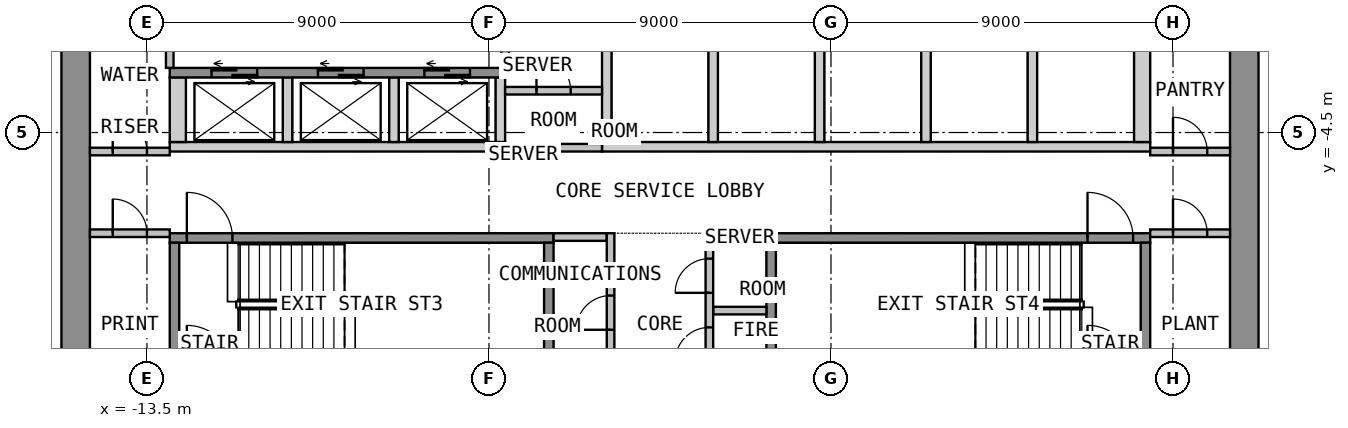
"""IFC4 building model, lengths in metres.
Left out: names, types, materials, properties, quantities, classifications, styles, units other than length and angle.
Written with IfcOpenShell. Run it as: python <this file> out.ifc"""

import sys

from ifc_helpers import new_model, si_unit, direction, frame, frame_2d, origin, place, context, subcontext, project, spatial, polyline, rectangle, outline, extrude, element, fill, save


model = new_model("IFC4")
c1 = context("Model", 3, precision=1e-05, world=origin(), true_north=direction((0.0, 1.0)))
c2 = subcontext(c1, "Body", "Model", "MODEL_VIEW")
j1 = project(units=[si_unit("LENGTHUNIT", "METRE"), si_unit("PLANEANGLEUNIT", "RADIAN")], contexts=[c1])
p1 = place(None, origin())
s1 = spatial("IfcSite", under=j1, at=p1, CompositionType="ELEMENT")
p2 = place(p1, origin())
s2 = spatial("IfcBuilding", under=s1, at=p2, CompositionType="ELEMENT")
p3 = place(p2, frame((0.0, 0.0, 132.6)))
s3 = spatial("IfcBuildingStorey", under=s2, at=p3, CompositionType="ELEMENT", Elevation=132.6)
p4 = place(p3, frame((-15.375, -12.75, 0.0), z_axis=(0.0, 0.0, 1.0), x_axis=(0.0, 1.0, 0.0)))
e1 = element("IfcWall", 1, at=p4, inside=s3, PredefinedType="SHEAR", context=c2, shape_type="SweptSolid", body=[
    extrude(rectangle(XDim=25.5, YDim=0.75, at=frame_2d((12.75, 0.0))), origin(), (0.0, 0.0, 1.0), 3.575),
])
p5 = place(p4, frame((11.55, 0.0, 0.0)))
e2 = element("IfcOpeningElement", 2, at=p5, cuts=e1, PredefinedType="OPENING", context=c2, shape_type="SweptSolid", body=[
    extrude(rectangle(XDim=2.4, YDim=2.1, at=frame_2d((1.2, 1.05))), frame((0.0, 0.385, 0.0), z_axis=(0.0, -1.0, 0.0), x_axis=(1.0, 0.0, 0.0)), (0.0, 0.0, 1.0), 0.77),
])
p6 = place(p3, frame((15.375, -12.75, 0.0), z_axis=(0.0, 0.0, 1.0), x_axis=(0.0, 1.0, 0.0)))
e3 = element("IfcWall", 3, at=p6, inside=s3, PredefinedType="SHEAR", context=c2, shape_type="SweptSolid", body=[
    extrude(rectangle(XDim=25.5, YDim=0.75, at=frame_2d((12.75, 0.0))), origin(), (0.0, 0.0, 1.0), 3.575),
])
p7 = place(p6, frame((11.55, 0.0, 0.0)))
e4 = element("IfcOpeningElement", 4, at=p7, cuts=e3, PredefinedType="OPENING", context=c2, shape_type="SweptSolid", body=[
    extrude(rectangle(XDim=2.4, YDim=2.1, at=frame_2d((1.2, 1.05))), frame((0.0, 0.385, 0.0), z_axis=(0.0, -1.0, 0.0), x_axis=(1.0, 0.0, 0.0)), (0.0, 0.0, 1.0), 0.77),
])
p8 = place(p3, origin())
e5 = element("IfcWall", 5, at=p8, inside=s3, PredefinedType="SHEAR", context=c2, shape_type="SweptSolid", body=[
    extrude(outline(polyline([(-12.9, -5.0), (-4.075, -5.0), (-4.075, -4.75), (-12.9, -4.75), (-12.9, -5.0)])), origin(), (0.0, 0.0, 1.0), 3.575),
])
p9 = place(p3, origin())
e6 = element("IfcWall", 6, at=p9, inside=s3, PredefinedType="SHEAR", context=c2, shape_type="SweptSolid", body=[
    extrude(outline(polyline([(-1.525, -5.0), (12.9, -5.0), (12.9, -4.75), (-1.525, -4.75), (-1.525, -5.0)])), origin(), (0.0, 0.0, 1.0), 3.575),
])
p10 = place(p3, origin())
e7 = element("IfcWall", 7, at=p10, inside=s3, PredefinedType="SHEAR", context=c2, shape_type="SweptSolid", body=[
    extrude(outline(polyline([(-12.9, -4.75), (-12.475, -4.75), (-12.475, -3.05), (-12.9, -3.05), (-12.9, -4.75)])), origin(), (0.0, 0.0, 1.0), 3.575),
])
p11 = place(p3, origin())
e8 = element("IfcWall", 8, at=p11, inside=s3, PredefinedType="SHEAR", context=c2, shape_type="SweptSolid", body=[
    extrude(outline(polyline([(-9.925, -4.75), (-9.675, -4.75), (-9.675, -3.05), (-9.925, -3.05), (-9.925, -4.75)])), origin(), (0.0, 0.0, 1.0), 3.575),
])
p12 = place(p3, origin())
e9 = element("IfcWall", 9, at=p12, inside=s3, PredefinedType="SHEAR", context=c2, shape_type="SweptSolid", body=[
    extrude(outline(polyline([(-7.125, -4.75), (-6.875, -4.75), (-6.875, -3.05), (-7.125, -3.05), (-7.125, -4.75)])), origin(), (0.0, 0.0, 1.0), 3.575),
])
p13 = place(p3, origin())
e10 = element("IfcWall", 10, at=p13, inside=s3, PredefinedType="SHEAR", context=c2, shape_type="SweptSolid", body=[
    extrude(outline(polyline([(-4.325, -4.75), (-4.075, -4.75), (-4.075, -3.05), (-4.325, -3.05), (-4.325, -4.75)])), origin(), (0.0, 0.0, 1.0), 3.575),
])
p14 = place(p3, origin())
e11 = element("IfcWall", 11, at=p14, inside=s3, PredefinedType="SHEAR", context=c2, shape_type="SweptSolid", body=[
    extrude(outline(polyline([(-1.525, -4.75), (-1.275, -4.75), (-1.275, -2.05), (-1.525, -2.05), (-1.525, -4.75)])), origin(), (0.0, 0.0, 1.0), 3.575),
])
p15 = place(p3, origin())
e12 = element("IfcWall", 12, at=p15, inside=s3, PredefinedType="SHEAR", context=c2, shape_type="SweptSolid", body=[
    extrude(outline(polyline([(1.275, -4.75), (1.525, -4.75), (1.525, -2.05), (1.275, -2.05), (1.275, -4.75)])), origin(), (0.0, 0.0, 1.0), 3.575),
])
p16 = place(p3, origin())
e13 = element("IfcWall", 13, at=p16, inside=s3, PredefinedType="SHEAR", context=c2, shape_type="SweptSolid", body=[
    extrude(outline(polyline([(4.075, -4.75), (4.325, -4.75), (4.325, -2.05), (4.075, -2.05), (4.075, -4.75)])), origin(), (0.0, 0.0, 1.0), 3.575),
])
p17 = place(p3, origin())
e14 = element("IfcWall", 14, at=p17, inside=s3, PredefinedType="SHEAR", context=c2, shape_type="SweptSolid", body=[
    extrude(outline(polyline([(6.875, -4.75), (7.125, -4.75), (7.125, -2.05), (6.875, -2.05), (6.875, -4.75)])), origin(), (0.0, 0.0, 1.0), 3.575),
])
p18 = place(p3, origin())
e15 = element("IfcWall", 15, at=p18, inside=s3, PredefinedType="SHEAR", context=c2, shape_type="SweptSolid", body=[
    extrude(outline(polyline([(9.675, -4.75), (9.925, -4.75), (9.925, -2.05), (9.675, -2.05), (9.675, -4.75)])), origin(), (0.0, 0.0, 1.0), 3.575),
])
p19 = place(p3, origin())
e16 = element("IfcWall", 16, at=p19, inside=s3, PredefinedType="SHEAR", context=c2, shape_type="SweptSolid", body=[
    extrude(outline(polyline([(12.475, -4.75), (12.9, -4.75), (12.9, -2.05), (12.475, -2.05), (12.475, -4.75)])), origin(), (0.0, 0.0, 1.0), 3.575),
])
p20 = place(p3, frame((-12.9, -2.925, 0.0), z_axis=(0.0, 0.0, 1.0), x_axis=(1.0, 0.0, 0.0)))
e17 = element("IfcWall", 17, at=p20, inside=s3, PredefinedType="SHEAR", context=c2, shape_type="SweptSolid", body=[
    extrude(rectangle(XDim=8.825, YDim=0.25, at=frame_2d((4.413, 0.0))), origin(), (0.0, 0.0, 1.0), 3.575),
])
p21 = place(p20, frame((1.1, 0.0, 0.0)))
e18 = element("IfcOpeningElement", 18, at=p21, cuts=e17, PredefinedType="OPENING", context=c2, shape_type="SweptSolid", body=[
    extrude(rectangle(XDim=1.2, YDim=2.1, at=frame_2d((0.6, 1.05))), frame((0.0, 0.135, 0.0), z_axis=(0.0, -1.0, 0.0), x_axis=(1.0, 0.0, 0.0)), (0.0, 0.0, 1.0), 0.27),
])
p22 = place(p20, frame((3.9, 0.0, 0.0)))
e19 = element("IfcOpeningElement", 19, at=p22, cuts=e17, PredefinedType="OPENING", context=c2, shape_type="SweptSolid", body=[
    extrude(rectangle(XDim=1.2, YDim=2.1, at=frame_2d((0.6, 1.05))), frame((0.0, 0.135, 0.0), z_axis=(0.0, -1.0, 0.0), x_axis=(1.0, 0.0, 0.0)), (0.0, 0.0, 1.0), 0.27),
])
p23 = place(p20, frame((6.7, 0.0, 0.0)))
e20 = element("IfcOpeningElement", 20, at=p23, cuts=e17, PredefinedType="OPENING", context=c2, shape_type="SweptSolid", body=[
    extrude(rectangle(XDim=1.2, YDim=2.1, at=frame_2d((0.6, 1.05))), frame((0.0, 0.135, 0.0), z_axis=(0.0, -1.0, 0.0), x_axis=(1.0, 0.0, 0.0)), (0.0, 0.0, 1.0), 0.27),
])
p24 = place(p3, frame((-12.9, -7.275, 0.0), z_axis=(0.0, 0.0, 1.0), x_axis=(1.0, 0.0, 0.0)))
e21 = element("IfcWall", 21, at=p24, inside=s3, PredefinedType="SHEAR", context=c2, shape_type="SweptSolid", body=[
    extrude(rectangle(XDim=10.1, YDim=0.25, at=frame_2d((5.05, 0.0))), origin(), (0.0, 0.0, 1.0), 3.575),
])
p25 = place(p24, frame((0.45, 0.0, 0.0)))
e22 = element("IfcOpeningElement", 22, at=p25, cuts=e21, PredefinedType="OPENING", context=c2, shape_type="SweptSolid", body=[
    extrude(rectangle(XDim=1.2, YDim=2.1, at=frame_2d((0.6, 1.05))), frame((0.0, 0.135, 0.0), z_axis=(0.0, -1.0, 0.0), x_axis=(1.0, 0.0, 0.0)), (0.0, 0.0, 1.0), 0.27),
])
for number, where, z_axis, x_axis in (
    (23, (-12.775, -10.65, 0.0), (0.0, 0.0, 1.0), (0.0, 1.0, 0.0)),
    (24, (-2.925, -10.65, 0.0), (0.0, 0.0, 1.0), (0.0, 1.0, 0.0)),
):
    element("IfcWall", number, at=place(p3, frame(where, z_axis=z_axis, x_axis=x_axis)), inside=s3, PredefinedType="SHEAR", context=c2, shape_type="SweptSolid", body=[
        extrude(rectangle(XDim=3.25, YDim=0.25, at=frame_2d((1.625, 0.0))), origin(), (0.0, 0.0, 1.0), 3.575),
    ])
p26 = place(p3, frame((2.8, -7.275, 0.0), z_axis=(0.0, 0.0, 1.0), x_axis=(1.0, 0.0, 0.0)))
e25 = element("IfcWall", 25, at=p26, inside=s3, PredefinedType="SHEAR", context=c2, shape_type="SweptSolid", body=[
    extrude(rectangle(XDim=10.1, YDim=0.25, at=frame_2d((5.05, 0.0))), origin(), (0.0, 0.0, 1.0), 3.575),
])
p27 = place(p26, frame((8.45, 0.0, 0.0)))
e26 = element("IfcOpeningElement", 26, at=p27, cuts=e25, PredefinedType="OPENING", context=c2, shape_type="SweptSolid", body=[
    extrude(rectangle(XDim=1.2, YDim=2.1, at=frame_2d((0.6, 1.05))), frame((0.0, 0.135, 0.0), z_axis=(0.0, -1.0, 0.0), x_axis=(1.0, 0.0, 0.0)), (0.0, 0.0, 1.0), 0.27),
])
for number, where, z_axis, x_axis in (
    (27, (2.925, -10.65, 0.0), (0.0, 0.0, 1.0), (0.0, 1.0, 0.0)),
    (28, (12.775, -10.65, 0.0), (0.0, 0.0, 1.0), (0.0, 1.0, 0.0)),
):
    element("IfcWall", number, at=place(p3, frame(where, z_axis=z_axis, x_axis=x_axis)), inside=s3, PredefinedType="SHEAR", context=c2, shape_type="SweptSolid", body=[
        extrude(rectangle(XDim=3.25, YDim=0.25, at=frame_2d((1.625, 0.0))), origin(), (0.0, 0.0, 1.0), 3.575),
    ])
for number, where, z_axis, x_axis in (
    (29, (-2.8, -7.25, 0.0), (0.0, 0.0, 1.0), (1.0, 0.0, 0.0)),
    (30, (1.4, -7.25, 0.0), (0.0, 0.0, 1.0), (1.0, 0.0, 0.0)),
    (31, (1.4, -9.186, 0.0), (0.0, 0.0, 1.0), (1.0, 0.0, 0.0)),
):
    element("IfcWall", number, at=place(p3, frame(where, z_axis=z_axis, x_axis=x_axis)), inside=s3, PredefinedType="PARTITIONING", context=c2, shape_type="SweptSolid", body=[
        extrude(rectangle(XDim=1.4, YDim=0.2, at=frame_2d((0.7, 0.0))), origin(), (0.0, 0.0, 1.0), 3.575),
    ])
p28 = place(p3, frame((-1.3, -12.75, 0.0), z_axis=(0.0, 0.0, 1.0), x_axis=(0.0, 1.0, 0.0)))
e32 = element("IfcWall", 32, at=p28, inside=s3, PredefinedType="PARTITIONING", context=c2, shape_type="SweptSolid", body=[
    extrude(rectangle(XDim=5.6, YDim=0.2, at=frame_2d((2.8, 0.0))), origin(), (0.0, 0.0, 1.0), 3.575),
])
p29 = place(p28, frame((0.36, 0.0, 0.0)))
e33 = element("IfcOpeningElement", 33, at=p29, cuts=e32, PredefinedType="OPENING", context=c2, shape_type="SweptSolid", body=[
    extrude(rectangle(XDim=0.9, YDim=2.1, at=frame_2d((0.45, 1.05))), frame((0.0, 0.11, 0.0), z_axis=(0.0, -1.0, 0.0), x_axis=(1.0, 0.0, 0.0)), (0.0, 0.0, 1.0), 0.22),
])
p30 = place(p28, frame((3.06, 0.0, 0.0)))
e34 = element("IfcOpeningElement", 34, at=p30, cuts=e32, PredefinedType="OPENING", context=c2, shape_type="SweptSolid", body=[
    extrude(rectangle(XDim=0.9, YDim=2.1, at=frame_2d((0.45, 1.05))), frame((0.0, 0.11, 0.0), z_axis=(0.0, -1.0, 0.0), x_axis=(1.0, 0.0, 0.0)), (0.0, 0.0, 1.0), 0.22),
])
p31 = place(p3, frame((1.3, -12.75, 0.0), z_axis=(0.0, 0.0, 1.0), x_axis=(0.0, 1.0, 0.0)))
e35 = element("IfcWall", 35, at=p31, inside=s3, PredefinedType="PARTITIONING", context=c2, shape_type="SweptSolid", body=[
    extrude(rectangle(XDim=5.6, YDim=0.2, at=frame_2d((2.8, 0.0))), origin(), (0.0, 0.0, 1.0), 3.575),
])
p32 = place(p31, frame((0.441, 0.0, 0.0)))
e36 = element("IfcOpeningElement", 36, at=p32, cuts=e35, PredefinedType="OPENING", context=c2, shape_type="SweptSolid", body=[
    extrude(rectangle(XDim=0.9, YDim=2.1, at=frame_2d((0.45, 1.05))), frame((0.0, 0.11, 0.0), z_axis=(0.0, -1.0, 0.0), x_axis=(1.0, 0.0, 0.0)), (0.0, 0.0, 1.0), 0.22),
])
p33 = place(p31, frame((2.223, 0.0, 0.0)))
e37 = element("IfcOpeningElement", 37, at=p33, cuts=e35, PredefinedType="OPENING", context=c2, shape_type="SweptSolid", body=[
    extrude(rectangle(XDim=0.9, YDim=2.1, at=frame_2d((0.45, 1.05))), frame((0.0, 0.11, 0.0), z_axis=(0.0, -1.0, 0.0), x_axis=(1.0, 0.0, 0.0)), (0.0, 0.0, 1.0), 0.22),
])
p34 = place(p31, frame((4.032, 0.0, 0.0)))
e38 = element("IfcOpeningElement", 38, at=p34, cuts=e35, PredefinedType="OPENING", context=c2, shape_type="SweptSolid", body=[
    extrude(rectangle(XDim=0.9, YDim=2.1, at=frame_2d((0.45, 1.05))), frame((0.0, 0.11, 0.0), z_axis=(0.0, -1.0, 0.0), x_axis=(1.0, 0.0, 0.0)), (0.0, 0.0, 1.0), 0.22),
])
p35 = place(p3, frame((-15.0, -7.15, 0.0), z_axis=(0.0, 0.0, 1.0), x_axis=(1.0, 0.0, 0.0)))
e39 = element("IfcWall", 39, at=p35, inside=s3, PredefinedType="PARTITIONING", context=c2, shape_type="SweptSolid", body=[
    extrude(rectangle(XDim=2.1, YDim=0.2, at=frame_2d((1.05, 0.0))), origin(), (0.0, 0.0, 1.0), 3.575),
])
p36 = place(p35, frame((0.6, 0.0, 0.0)))
e40 = element("IfcOpeningElement", 40, at=p36, cuts=e39, PredefinedType="OPENING", context=c2, shape_type="SweptSolid", body=[
    extrude(rectangle(XDim=0.9, YDim=2.1, at=frame_2d((0.45, 1.05))), frame((0.0, 0.11, 0.0), z_axis=(0.0, -1.0, 0.0), x_axis=(1.0, 0.0, 0.0)), (0.0, 0.0, 1.0), 0.22),
])
p37 = place(p3, frame((-15.0, -5.0, 0.0), z_axis=(0.0, 0.0, 1.0), x_axis=(1.0, 0.0, 0.0)))
e41 = element("IfcWall", 41, at=p37, inside=s3, PredefinedType="PARTITIONING", context=c2, shape_type="SweptSolid", body=[
    extrude(rectangle(XDim=2.1, YDim=0.2, at=frame_2d((1.05, 0.0))), origin(), (0.0, 0.0, 1.0), 3.575),
])
p38 = place(p37, frame((0.6, 0.0, 0.0)))
e42 = element("IfcOpeningElement", 42, at=p38, cuts=e41, PredefinedType="OPENING", context=c2, shape_type="SweptSolid", body=[
    extrude(rectangle(XDim=0.9, YDim=2.1, at=frame_2d((0.45, 1.05))), frame((0.0, 0.11, 0.0), z_axis=(0.0, -1.0, 0.0), x_axis=(1.0, 0.0, 0.0)), (0.0, 0.0, 1.0), 0.22),
])
p39 = place(p3, frame((12.9, -7.15, 0.0), z_axis=(0.0, 0.0, 1.0), x_axis=(1.0, 0.0, 0.0)))
e43 = element("IfcWall", 43, at=p39, inside=s3, PredefinedType="PARTITIONING", context=c2, shape_type="SweptSolid", body=[
    extrude(rectangle(XDim=2.1, YDim=0.2, at=frame_2d((1.05, 0.0))), origin(), (0.0, 0.0, 1.0), 3.575),
])
p40 = place(p39, frame((0.6, 0.0, 0.0)))
e44 = element("IfcOpeningElement", 44, at=p40, cuts=e43, PredefinedType="OPENING", context=c2, shape_type="SweptSolid", body=[
    extrude(rectangle(XDim=0.9, YDim=2.1, at=frame_2d((0.45, 1.05))), frame((0.0, 0.11, 0.0), z_axis=(0.0, -1.0, 0.0), x_axis=(1.0, 0.0, 0.0)), (0.0, 0.0, 1.0), 0.22),
])
p41 = place(p3, frame((12.9, -5.0, 0.0), z_axis=(0.0, 0.0, 1.0), x_axis=(1.0, 0.0, 0.0)))
e45 = element("IfcWall", 45, at=p41, inside=s3, PredefinedType="PARTITIONING", context=c2, shape_type="SweptSolid", body=[
    extrude(rectangle(XDim=2.1, YDim=0.2, at=frame_2d((1.05, 0.0))), origin(), (0.0, 0.0, 1.0), 3.575),
])
p42 = place(p41, frame((0.6, 0.0, 0.0)))
e46 = element("IfcOpeningElement", 46, at=p42, cuts=e45, PredefinedType="OPENING", context=c2, shape_type="SweptSolid", body=[
    extrude(rectangle(XDim=0.9, YDim=2.1, at=frame_2d((0.45, 1.05))), frame((0.0, 0.11, 0.0), z_axis=(0.0, -1.0, 0.0), x_axis=(1.0, 0.0, 0.0)), (0.0, 0.0, 1.0), 0.22),
])
p43 = place(p3, frame((-4.075, -3.4, 0.0), z_axis=(0.0, 0.0, 1.0), x_axis=(1.0, 0.0, 0.0)))
e47 = element("IfcWall", 47, at=p43, inside=s3, PredefinedType="PARTITIONING", context=c2, shape_type="SweptSolid", body=[
    extrude(rectangle(XDim=2.55, YDim=0.2, at=frame_2d((1.275, 0.0))), origin(), (0.0, 0.0, 1.0), 3.575),
])
p44 = place(p43, frame((0.825, 0.0, 0.0)))
e48 = element("IfcOpeningElement", 48, at=p44, cuts=e47, PredefinedType="OPENING", context=c2, shape_type="SweptSolid", body=[
    extrude(rectangle(XDim=0.9, YDim=2.1, at=frame_2d((0.45, 1.05))), frame((0.0, 0.11, 0.0), z_axis=(0.0, -1.0, 0.0), x_axis=(1.0, 0.0, 0.0)), (0.0, 0.0, 1.0), 0.22),
])
p45 = place(p3, frame((-4.075, -4.9, 0.0), z_axis=(0.0, 0.0, 1.0), x_axis=(1.0, 0.0, 0.0)))
e49 = element("IfcWall", 49, at=p45, inside=s3, PredefinedType="PARTITIONING", context=c2, shape_type="SweptSolid", body=[
    extrude(rectangle(XDim=2.55, YDim=0.2, at=frame_2d((1.275, 0.0))), origin(), (0.0, 0.0, 1.0), 3.575),
])
p46 = place(p3, frame((-4.075, -1.9, 0.0), z_axis=(0.0, 0.0, 1.0), x_axis=(0.0, -1.0, 0.0)))
e50 = element("IfcWall", 50, at=p46, inside=s3, PredefinedType="PARTITIONING", context=c2, shape_type="SweptSolid", body=[
    extrude(rectangle(XDim=1.15, YDim=0.2, at=frame_2d((0.575, 0.0))), origin(), (0.0, 0.0, 1.0), 3.575),
])
p47 = place(p3, frame((-12.9, -2.799, 0.0), z_axis=(0.0, 0.0, 1.0), x_axis=(0.0, 1.0, 0.0)))
e51 = element("IfcWall", 51, at=p47, inside=s3, PredefinedType="PARTITIONING", context=c2, shape_type="SweptSolid", body=[
    extrude(rectangle(XDim=0.898, YDim=0.2, at=frame_2d((0.449, 0.0))), origin(), (0.0, 0.0, 1.0), 3.575),
])
p48 = place(p21, origin())
e52 = element("IfcDoor", 52, at=p48, inside=s3, OperationType="DOUBLE_DOOR_SLIDING", PredefinedType="DOOR", context=c2, shape_type="SweptSolid", body=[
    extrude(rectangle(XDim=1.2, YDim=2.1, at=frame_2d((0.6, 1.05))), frame((0.0, 0.025, 0.0), z_axis=(0.0, -1.0, 0.0), x_axis=(1.0, 0.0, 0.0)), (0.0, 0.0, 1.0), 0.05),
])
fill(e18, e52)
p49 = place(p22, origin())
e53 = element("IfcDoor", 53, at=p49, inside=s3, OperationType="DOUBLE_DOOR_SLIDING", PredefinedType="DOOR", context=c2, shape_type="SweptSolid", body=[
    extrude(rectangle(XDim=1.2, YDim=2.1, at=frame_2d((0.6, 1.05))), frame((0.0, 0.025, 0.0), z_axis=(0.0, -1.0, 0.0), x_axis=(1.0, 0.0, 0.0)), (0.0, 0.0, 1.0), 0.05),
])
fill(e19, e53)
p50 = place(p23, origin())
e54 = element("IfcDoor", 54, at=p50, inside=s3, OperationType="DOUBLE_DOOR_SLIDING", PredefinedType="DOOR", context=c2, shape_type="SweptSolid", body=[
    extrude(rectangle(XDim=1.2, YDim=2.1, at=frame_2d((0.6, 1.05))), frame((0.0, 0.025, 0.0), z_axis=(0.0, -1.0, 0.0), x_axis=(1.0, 0.0, 0.0)), (0.0, 0.0, 1.0), 0.05),
])
fill(e20, e54)
p51 = place(p25, origin())
e55 = element("IfcDoor", 55, at=p51, inside=s3, OperationType="SINGLE_SWING_LEFT", PredefinedType="DOOR", context=c2, shape_type="SweptSolid", body=[
    extrude(rectangle(XDim=1.2, YDim=2.1, at=frame_2d((0.6, 1.05))), frame((0.0, 0.025, 0.0), z_axis=(0.0, -1.0, 0.0), x_axis=(1.0, 0.0, 0.0)), (0.0, 0.0, 1.0), 0.05),
])
fill(e22, e55)
p52 = place(p27, origin())
e56 = element("IfcDoor", 56, at=p52, inside=s3, OperationType="SINGLE_SWING_LEFT", PredefinedType="DOOR", context=c2, shape_type="SweptSolid", body=[
    extrude(rectangle(XDim=1.2, YDim=2.1, at=frame_2d((0.6, 1.05))), frame((0.0, 0.025, 0.0), z_axis=(0.0, -1.0, 0.0), x_axis=(1.0, 0.0, 0.0)), (0.0, 0.0, 1.0), 0.05),
])
fill(e26, e56)
p53 = place(p30, origin())
e57 = element("IfcDoor", 57, at=p53, inside=s3, OperationType="SINGLE_SWING_LEFT", PredefinedType="DOOR", context=c2, shape_type="SweptSolid", body=[
    extrude(rectangle(XDim=0.9, YDim=2.1, at=frame_2d((0.45, 1.05))), frame((0.0, 0.025, 0.0), z_axis=(0.0, -1.0, 0.0), x_axis=(1.0, 0.0, 0.0)), (0.0, 0.0, 1.0), 0.05),
])
fill(e34, e57)
p54 = place(p33, origin())
e58 = element("IfcDoor", 58, at=p54, inside=s3, OperationType="SINGLE_SWING_LEFT", PredefinedType="DOOR", context=c2, shape_type="SweptSolid", body=[
    extrude(rectangle(XDim=0.9, YDim=2.1, at=frame_2d((0.45, 1.05))), frame((0.0, 0.025, 0.0), z_axis=(0.0, -1.0, 0.0), x_axis=(1.0, 0.0, 0.0)), (0.0, 0.0, 1.0), 0.05),
])
fill(e37, e58)
p55 = place(p34, origin())
e59 = element("IfcDoor", 59, at=p55, inside=s3, OperationType="SINGLE_SWING_LEFT", PredefinedType="DOOR", context=c2, shape_type="SweptSolid", body=[
    extrude(rectangle(XDim=0.9, YDim=2.1, at=frame_2d((0.45, 1.05))), frame((0.0, 0.025, 0.0), z_axis=(0.0, -1.0, 0.0), x_axis=(1.0, 0.0, 0.0)), (0.0, 0.0, 1.0), 0.05),
])
fill(e38, e59)
p56 = place(p36, origin())
e60 = element("IfcDoor", 60, at=p56, inside=s3, OperationType="SINGLE_SWING_LEFT", PredefinedType="DOOR", context=c2, shape_type="SweptSolid", body=[
    extrude(rectangle(XDim=0.9, YDim=2.1, at=frame_2d((0.45, 1.05))), frame((0.0, 0.025, 0.0), z_axis=(0.0, -1.0, 0.0), x_axis=(1.0, 0.0, 0.0)), (0.0, 0.0, 1.0), 0.05),
])
fill(e40, e60)
p57 = place(p38, origin())
e61 = element("IfcDoor", 61, at=p57, inside=s3, OperationType="SINGLE_SWING_LEFT", PredefinedType="DOOR", context=c2, shape_type="SweptSolid", body=[
    extrude(rectangle(XDim=0.9, YDim=2.1, at=frame_2d((0.45, 1.05))), frame((0.0, 0.025, 0.0), z_axis=(0.0, -1.0, 0.0), x_axis=(1.0, 0.0, 0.0)), (0.0, 0.0, 1.0), 0.05),
])
fill(e42, e61)
p58 = place(p40, origin())
e62 = element("IfcDoor", 62, at=p58, inside=s3, OperationType="SINGLE_SWING_LEFT", PredefinedType="DOOR", context=c2, shape_type="SweptSolid", body=[
    extrude(rectangle(XDim=0.9, YDim=2.1, at=frame_2d((0.45, 1.05))), frame((0.0, 0.025, 0.0), z_axis=(0.0, -1.0, 0.0), x_axis=(1.0, 0.0, 0.0)), (0.0, 0.0, 1.0), 0.05),
])
fill(e44, e62)
p59 = place(p42, origin())
e63 = element("IfcDoor", 63, at=p59, inside=s3, OperationType="SINGLE_SWING_LEFT", PredefinedType="DOOR", context=c2, shape_type="SweptSolid", body=[
    extrude(rectangle(XDim=0.9, YDim=2.1, at=frame_2d((0.45, 1.05))), frame((0.0, 0.025, 0.0), z_axis=(0.0, -1.0, 0.0), x_axis=(1.0, 0.0, 0.0)), (0.0, 0.0, 1.0), 0.05),
])
fill(e46, e63)
p60 = place(p44, origin())
e64 = element("IfcDoor", 64, at=p60, inside=s3, OperationType="SINGLE_SWING_LEFT", PredefinedType="DOOR", context=c2, shape_type="SweptSolid", body=[
    extrude(rectangle(XDim=0.9, YDim=2.1, at=frame_2d((0.45, 1.05))), frame((0.0, 0.025, 0.0), z_axis=(0.0, -1.0, 0.0), x_axis=(1.0, 0.0, 0.0)), (0.0, 0.0, 1.0), 0.05),
])
fill(e48, e64)
save(model, sys.argv[1])
